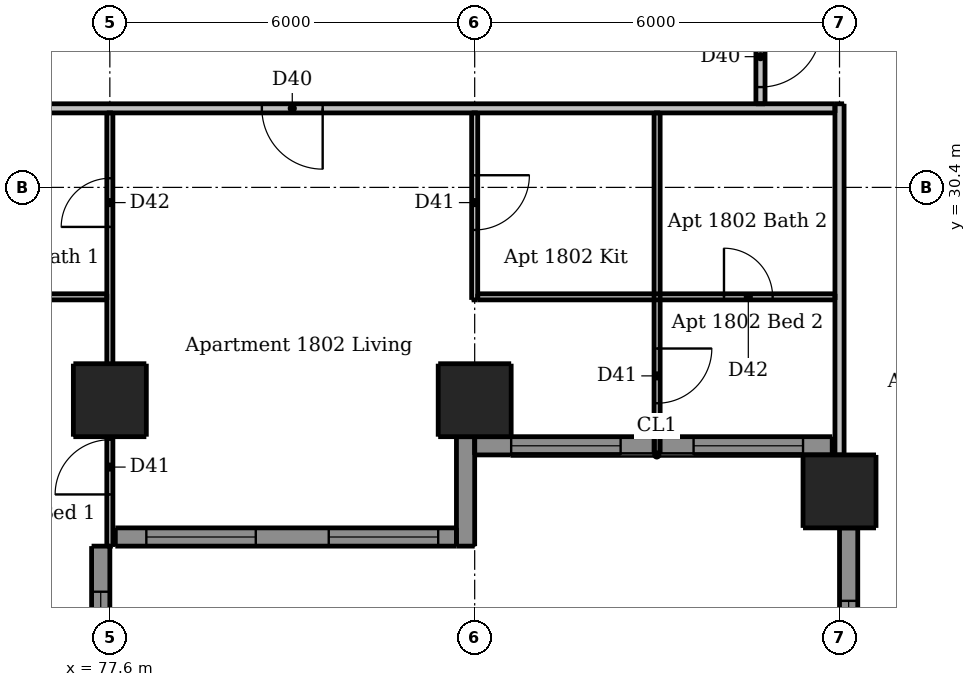
"""IFC4 building model, lengths in metres.
Left out: names, types, materials, properties, quantities, classifications, styles, units other than length and angle.
Written with IfcOpenShell. Run it as: python <this file> out.ifc"""

import sys

from ifc_helpers import new_model, si_unit, direction, frame, frame_2d, origin, origin_2d, place, context, subcontext, project, spatial, rectangle, extrude, element, fill, save


model = new_model("IFC4")
c1 = context("Model", 3, precision=1e-05, world=origin(), true_north=direction((0.0, 1.0)))
c2 = subcontext(c1, "Body", "Model", "MODEL_VIEW")
j1 = project(units=[si_unit("LENGTHUNIT", "METRE"), si_unit("PLANEANGLEUNIT", "RADIAN")], contexts=[c1])
p1 = place(None, origin())
s1 = spatial("IfcSite", under=j1, at=p1, CompositionType="ELEMENT")
p2 = place(p1, origin())
s2 = spatial("IfcBuilding", under=s1, at=p2, CompositionType="ELEMENT")
p3 = place(p2, frame((0.0, 0.0, 66.4)))
s3 = spatial("IfcBuildingStorey", under=s2, at=p3, CompositionType="ELEMENT", Elevation=66.4)
for number, where, z_axis, x_axis in (
    (1, (77.6, 26.9, 0.0), (0.0, 0.0, 1.0), (1.0, 0.0, 0.0)),
    (2, (83.6, 26.9, 0.0), (0.0, 0.0, 1.0), (1.0, 0.0, 0.0)),
    (3, (89.6, 25.4, 0.0), (0.0, 0.0, 1.0), (1.0, 0.0, 0.0)),
):
    element("IfcColumn", number, at=place(p3, frame(where, z_axis=z_axis, x_axis=x_axis)), inside=s3, PredefinedType="COLUMN", context=c2, shape_type="SweptSolid", body=[
        extrude(rectangle(XDim=1.2, YDim=1.2, at=origin_2d()), origin(), (0.0, 0.0, 1.0), 2.95),
    ])
p4 = place(p3, frame((77.45, 21.5, 0.0), z_axis=(0.0, 0.0, 1.0), x_axis=(0.0, 1.0, 0.0)))
e4 = element("IfcWall", 4, at=p4, inside=s3, PredefinedType="SOLIDWALL", context=c2, shape_type="SweptSolid", body=[
    extrude(rectangle(XDim=3.0, YDim=0.3, at=frame_2d((1.5, 0.0))), origin(), (0.0, 0.0, 1.0), 2.95),
])
p5 = place(p4, frame((0.75, 0.0, 0.9)))
e5 = element("IfcOpeningElement", 5, at=p5, cuts=e4, PredefinedType="OPENING", context=c2, shape_type="SweptSolid", body=[
    extrude(rectangle(XDim=1.5, YDim=1.5, at=frame_2d((0.75, 0.75))), frame((0.0, 0.16, 0.0), z_axis=(0.0, -1.0, 0.0), x_axis=(1.0, 0.0, 0.0)), (0.0, 0.0, 1.0), 0.32),
])
p6 = place(p3, frame((83.45, 24.5, 0.0), z_axis=(0.0, 0.0, 1.0), x_axis=(0.0, 1.0, 0.0)))
e6 = element("IfcWall", 6, at=p6, inside=s3, PredefinedType="SOLIDWALL", context=c2, shape_type="SweptSolid", body=[
    extrude(rectangle(XDim=1.8, YDim=0.3, at=frame_2d((0.9, 0.0))), origin(), (0.0, 0.0, 1.0), 2.95),
])
p7 = place(p3, frame((89.75, 24.8, 0.0), z_axis=(0.0, 0.0, 1.0), x_axis=(0.0, -1.0, 0.0)))
e7 = element("IfcWall", 7, at=p7, inside=s3, PredefinedType="SOLIDWALL", context=c2, shape_type="SweptSolid", body=[
    extrude(rectangle(XDim=4.8, YDim=0.3, at=frame_2d((2.4, 0.0))), origin(), (0.0, 0.0, 1.0), 2.95),
])
p8 = place(p7, frame((1.2, 0.0, 0.15)))
e8 = element("IfcOpeningElement", 8, at=p8, cuts=e7, PredefinedType="OPENING", context=c2, shape_type="SweptSolid", body=[
    extrude(rectangle(XDim=2.4, YDim=2.1, at=frame_2d((1.2, 1.05))), frame((0.0, 0.16, 0.0), z_axis=(0.0, -1.0, 0.0), x_axis=(1.0, 0.0, 0.0)), (0.0, 0.0, 1.0), 0.32),
])
p9 = place(p3, frame((77.69, 24.65, 0.0), z_axis=(0.0, 0.0, 1.0), x_axis=(1.0, 0.0, 0.0)))
e9 = element("IfcWall", 9, at=p9, inside=s3, PredefinedType="SOLIDWALL", context=c2, shape_type="SweptSolid", body=[
    extrude(rectangle(XDim=5.61, YDim=0.3, at=frame_2d((2.805, 0.0))), origin(), (0.0, 0.0, 1.0), 2.95),
])
p10 = place(p9, frame((0.51, 0.0, 0.15)))
e10 = element("IfcOpeningElement", 10, at=p10, cuts=e9, PredefinedType="OPENING", context=c2, shape_type="SweptSolid", body=[
    extrude(rectangle(XDim=1.8, YDim=2.1, at=frame_2d((0.9, 1.05))), frame((0.0, 0.16, 0.0), z_axis=(0.0, -1.0, 0.0), x_axis=(1.0, 0.0, 0.0)), (0.0, 0.0, 1.0), 0.32),
])
p11 = place(p9, frame((3.51, 0.0, 0.15)))
e11 = element("IfcOpeningElement", 11, at=p11, cuts=e9, PredefinedType="OPENING", context=c2, shape_type="SweptSolid", body=[
    extrude(rectangle(XDim=1.8, YDim=2.1, at=frame_2d((0.9, 1.05))), frame((0.0, 0.16, 0.0), z_axis=(0.0, -1.0, 0.0), x_axis=(1.0, 0.0, 0.0)), (0.0, 0.0, 1.0), 0.32),
])
p12 = place(p3, frame((83.6, 26.15, 0.0), z_axis=(0.0, 0.0, 1.0), x_axis=(1.0, 0.0, 0.0)))
e12 = element("IfcWall", 12, at=p12, inside=s3, PredefinedType="SOLIDWALL", context=c2, shape_type="SweptSolid", body=[
    extrude(rectangle(XDim=5.88, YDim=0.3, at=frame_2d((2.94, 0.0))), origin(), (0.0, 0.0, 1.0), 2.95),
])
p13 = place(p12, frame((0.6, 0.0, 0.15)))
e13 = element("IfcOpeningElement", 13, at=p13, cuts=e12, PredefinedType="OPENING", context=c2, shape_type="SweptSolid", body=[
    extrude(rectangle(XDim=1.8, YDim=2.1, at=frame_2d((0.9, 1.05))), frame((0.0, 0.16, 0.0), z_axis=(0.0, -1.0, 0.0), x_axis=(1.0, 0.0, 0.0)), (0.0, 0.0, 1.0), 0.32),
])
p14 = place(p12, frame((3.6, 0.0, 0.15)))
e14 = element("IfcOpeningElement", 14, at=p14, cuts=e12, PredefinedType="OPENING", context=c2, shape_type="SweptSolid", body=[
    extrude(rectangle(XDim=1.8, YDim=2.1, at=frame_2d((0.9, 1.05))), frame((0.0, 0.16, 0.0), z_axis=(0.0, -1.0, 0.0), x_axis=(1.0, 0.0, 0.0)), (0.0, 0.0, 1.0), 0.32),
])
p15 = place(p3, frame((77.6, 24.5, 0.0), z_axis=(0.0, 0.0, 1.0), x_axis=(0.0, 1.0, 0.0)))
e15 = element("IfcWall", 15, at=p15, inside=s3, PredefinedType="PARTITIONING", context=c2, shape_type="SweptSolid", body=[
    extrude(rectangle(XDim=7.125, YDim=0.1, at=frame_2d((3.562, 0.0))), origin(), (0.0, 0.0, 1.0), 2.332),
])
p16 = place(p15, frame((0.85, 0.0, 0.0)))
e16 = element("IfcOpeningElement", 16, at=p16, cuts=e15, PredefinedType="OPENING", context=c2, shape_type="SweptSolid", body=[
    extrude(rectangle(XDim=0.9, YDim=2.1, at=frame_2d((0.45, 1.05))), frame((0.0, 0.06, 0.0), z_axis=(0.0, -1.0, 0.0), x_axis=(1.0, 0.0, 0.0)), (0.0, 0.0, 1.0), 0.12),
])
p17 = place(p15, frame((5.25, 0.0, 0.0)))
e17 = element("IfcOpeningElement", 17, at=p17, cuts=e15, PredefinedType="OPENING", context=c2, shape_type="SweptSolid", body=[
    extrude(rectangle(XDim=0.8, YDim=2.1, at=frame_2d((0.4, 1.05))), frame((0.0, 0.06, 0.0), z_axis=(0.0, -1.0, 0.0), x_axis=(1.0, 0.0, 0.0)), (0.0, 0.0, 1.0), 0.12),
])
p18 = place(p3, frame((83.6, 31.625, 0.0), z_axis=(0.0, 0.0, 1.0), x_axis=(0.0, -1.0, 0.0)))
e18 = element("IfcWall", 18, at=p18, inside=s3, PredefinedType="PARTITIONING", context=c2, shape_type="SweptSolid", body=[
    extrude(rectangle(XDim=3.075, YDim=0.1, at=frame_2d((1.538, 0.0))), origin(), (0.0, 0.0, 1.0), 2.332),
])
p19 = place(p18, frame((1.025, 0.0, 0.0)))
e19 = element("IfcOpeningElement", 19, at=p19, cuts=e18, PredefinedType="OPENING", context=c2, shape_type="SweptSolid", body=[
    extrude(rectangle(XDim=0.9, YDim=2.1, at=frame_2d((0.45, 1.05))), frame((0.0, 0.06, 0.0), z_axis=(0.0, -1.0, 0.0), x_axis=(1.0, 0.0, 0.0)), (0.0, 0.0, 1.0), 0.12),
])
p20 = place(p3, frame((86.6, 31.625, 0.0), z_axis=(0.0, 0.0, 1.0), x_axis=(0.0, -1.0, 0.0)))
e20 = element("IfcWall", 20, at=p20, inside=s3, PredefinedType="PARTITIONING", context=c2, shape_type="SweptSolid", body=[
    extrude(rectangle(XDim=5.625, YDim=0.1, at=frame_2d((2.812, 0.0))), origin(), (0.0, 0.0, 1.0), 2.95),
])
p21 = place(p20, frame((3.875, 0.0, 0.0)))
e21 = element("IfcOpeningElement", 21, at=p21, cuts=e20, PredefinedType="OPENING", context=c2, shape_type="SweptSolid", body=[
    extrude(rectangle(XDim=0.9, YDim=2.1, at=frame_2d((0.45, 1.05))), frame((0.0, 0.06, 0.0), z_axis=(0.0, -1.0, 0.0), x_axis=(1.0, 0.0, 0.0)), (0.0, 0.0, 1.0), 0.12),
])
p22 = place(p3, frame((74.675, 28.6, 0.0), z_axis=(0.0, 0.0, 1.0), x_axis=(1.0, 0.0, 0.0)))
e22 = element("IfcWall", 22, at=p22, inside=s3, PredefinedType="PARTITIONING", context=c2, shape_type="SweptSolid", body=[
    extrude(rectangle(XDim=2.875, YDim=0.1, at=frame_2d((1.438, 0.0))), origin(), (0.0, 0.0, 1.0), 2.95),
])
p23 = place(p3, frame((83.65, 28.6, 0.0), z_axis=(0.0, 0.0, 1.0), x_axis=(1.0, 0.0, 0.0)))
e23 = element("IfcWall", 23, at=p23, inside=s3, PredefinedType="PARTITIONING", context=c2, shape_type="SweptSolid", body=[
    extrude(rectangle(XDim=5.875, YDim=0.1, at=frame_2d((2.938, 0.0))), origin(), (0.0, 0.0, 1.0), 2.95),
])
p24 = place(p23, frame((4.05, 0.0, 0.0)))
e24 = element("IfcOpeningElement", 24, at=p24, cuts=e23, PredefinedType="OPENING", context=c2, shape_type="SweptSolid", body=[
    extrude(rectangle(XDim=0.8, YDim=2.1, at=frame_2d((0.4, 1.05))), frame((0.0, 0.06, 0.0), z_axis=(0.0, -1.0, 0.0), x_axis=(1.0, 0.0, 0.0)), (0.0, 0.0, 1.0), 0.12),
])
p25 = place(p3, frame((88.3, 60.475, 0.0), z_axis=(0.0, 0.0, 1.0), x_axis=(0.0, -1.0, 0.0)))
e25 = element("IfcWall", 25, at=p25, inside=s3, PredefinedType="PARTITIONING", context=c2, shape_type="SweptSolid", body=[
    extrude(rectangle(XDim=28.7, YDim=0.15, at=frame_2d((14.35, 0.0))), origin(), (0.0, 0.0, 1.0), 2.95),
])
p26 = place(p25, frame((27.425, 0.0, 0.0)))
e26 = element("IfcOpeningElement", 26, at=p26, cuts=e25, PredefinedType="OPENING", context=c2, shape_type="SweptSolid", body=[
    extrude(rectangle(XDim=1.0, YDim=2.1, at=frame_2d((0.5, 1.05))), frame((0.0, 0.085, 0.0), z_axis=(0.0, -1.0, 0.0), x_axis=(1.0, 0.0, 0.0)), (0.0, 0.0, 1.0), 0.17),
])
p27 = place(p25, frame((14.525, 0.0, 0.0)))
e27 = element("IfcOpeningElement", 27, at=p27, cuts=e25, PredefinedType="OPENING", context=c2, shape_type="SweptSolid", body=[
    extrude(rectangle(XDim=1.0, YDim=2.1, at=frame_2d((0.5, 1.05))), frame((0.0, 0.085, 0.0), z_axis=(0.0, -1.0, 0.0), x_axis=(1.0, 0.0, 0.0)), (0.0, 0.0, 1.0), 0.17),
])
p28 = place(p25, frame((3.775, 0.0, 0.0)))
e28 = element("IfcOpeningElement", 28, at=p28, cuts=e25, PredefinedType="OPENING", context=c2, shape_type="SweptSolid", body=[
    extrude(rectangle(XDim=1.0, YDim=2.1, at=frame_2d((0.5, 1.05))), frame((0.0, 0.085, 0.0), z_axis=(0.0, -1.0, 0.0), x_axis=(1.0, 0.0, 0.0)), (0.0, 0.0, 1.0), 0.17),
])
p29 = place(p3, frame((89.6, 26.0, 0.0), z_axis=(0.0, 0.0, 1.0), x_axis=(0.0, 1.0, 0.0)))
e29 = element("IfcWall", 29, at=p29, inside=s3, PredefinedType="PARTITIONING", context=c2, shape_type="SweptSolid", body=[
    extrude(rectangle(XDim=5.775, YDim=0.15, at=frame_2d((2.887, 0.0))), origin(), (0.0, 0.0, 1.0), 2.332),
])
p30 = place(p3, frame((89.525, 31.7, 0.0), z_axis=(0.0, 0.0, 1.0), x_axis=(-1.0, 0.0, 0.0)))
e30 = element("IfcWall", 30, at=p30, inside=s3, PredefinedType="PARTITIONING", context=c2, shape_type="SweptSolid", body=[
    extrude(rectangle(XDim=28.75, YDim=0.15, at=frame_2d((14.375, 0.0))), origin(), (0.0, 0.0, 1.0), 2.95),
])
p31 = place(p30, frame((24.625, 0.0, 0.0)))
e31 = element("IfcOpeningElement", 31, at=p31, cuts=e30, PredefinedType="OPENING", context=c2, shape_type="SweptSolid", body=[
    extrude(rectangle(XDim=1.0, YDim=2.1, at=frame_2d((0.5, 1.05))), frame((0.0, 0.085, 0.0), z_axis=(0.0, -1.0, 0.0), x_axis=(1.0, 0.0, 0.0)), (0.0, 0.0, 1.0), 0.17),
])
p32 = place(p30, frame((8.425, 0.0, 0.0)))
e32 = element("IfcOpeningElement", 32, at=p32, cuts=e30, PredefinedType="OPENING", context=c2, shape_type="SweptSolid", body=[
    extrude(rectangle(XDim=1.0, YDim=2.1, at=frame_2d((0.5, 1.05))), frame((0.0, 0.085, 0.0), z_axis=(0.0, -1.0, 0.0), x_axis=(1.0, 0.0, 0.0)), (0.0, 0.0, 1.0), 0.17),
])
p33 = place(p5, origin())
e33 = element("IfcWindow", 33, at=p33, inside=s3, PartitioningType="DOUBLE_PANEL_VERTICAL", PredefinedType="WINDOW", context=c2, shape_type="SweptSolid", body=[
    extrude(rectangle(XDim=1.5, YDim=1.5, at=frame_2d((0.75, 0.75))), frame((0.0, 0.03, 0.0), z_axis=(0.0, -1.0, 0.0), x_axis=(1.0, 0.0, 0.0)), (0.0, 0.0, 1.0), 0.06),
])
fill(e5, e33)
p34 = place(p8, origin())
e34 = element("IfcWindow", 34, at=p34, inside=s3, PartitioningType="DOUBLE_PANEL_VERTICAL", PredefinedType="WINDOW", context=c2, shape_type="SweptSolid", body=[
    extrude(rectangle(XDim=2.4, YDim=2.1, at=frame_2d((1.2, 1.05))), frame((0.0, 0.03, 0.0), z_axis=(0.0, -1.0, 0.0), x_axis=(1.0, 0.0, 0.0)), (0.0, 0.0, 1.0), 0.06),
])
fill(e8, e34)
p35 = place(p10, origin())
e35 = element("IfcWindow", 35, at=p35, inside=s3, PartitioningType="DOUBLE_PANEL_VERTICAL", PredefinedType="WINDOW", context=c2, shape_type="SweptSolid", body=[
    extrude(rectangle(XDim=1.8, YDim=2.1, at=frame_2d((0.9, 1.05))), frame((0.0, 0.03, 0.0), z_axis=(0.0, -1.0, 0.0), x_axis=(1.0, 0.0, 0.0)), (0.0, 0.0, 1.0), 0.06),
])
fill(e10, e35)
p36 = place(p11, origin())
e36 = element("IfcWindow", 36, at=p36, inside=s3, PartitioningType="DOUBLE_PANEL_VERTICAL", PredefinedType="WINDOW", context=c2, shape_type="SweptSolid", body=[
    extrude(rectangle(XDim=1.8, YDim=2.1, at=frame_2d((0.9, 1.05))), frame((0.0, 0.03, 0.0), z_axis=(0.0, -1.0, 0.0), x_axis=(1.0, 0.0, 0.0)), (0.0, 0.0, 1.0), 0.06),
])
fill(e11, e36)
p37 = place(p13, origin())
e37 = element("IfcWindow", 37, at=p37, inside=s3, PartitioningType="DOUBLE_PANEL_VERTICAL", PredefinedType="WINDOW", context=c2, shape_type="SweptSolid", body=[
    extrude(rectangle(XDim=1.8, YDim=2.1, at=frame_2d((0.9, 1.05))), frame((0.0, 0.03, 0.0), z_axis=(0.0, -1.0, 0.0), x_axis=(1.0, 0.0, 0.0)), (0.0, 0.0, 1.0), 0.06),
])
fill(e13, e37)
p38 = place(p14, origin())
e38 = element("IfcWindow", 38, at=p38, inside=s3, PartitioningType="DOUBLE_PANEL_VERTICAL", PredefinedType="WINDOW", context=c2, shape_type="SweptSolid", body=[
    extrude(rectangle(XDim=1.8, YDim=2.1, at=frame_2d((0.9, 1.05))), frame((0.0, 0.03, 0.0), z_axis=(0.0, -1.0, 0.0), x_axis=(1.0, 0.0, 0.0)), (0.0, 0.0, 1.0), 0.06),
])
fill(e14, e38)
p39 = place(p32, origin())
e39 = element("IfcDoor", 39, at=p39, inside=s3, OperationType="SINGLE_SWING_LEFT", PredefinedType="DOOR", context=c2, shape_type="SweptSolid", body=[
    extrude(rectangle(XDim=1.0, YDim=2.1, at=frame_2d((0.5, 1.05))), frame((0.0, 0.025, 0.0), z_axis=(0.0, -1.0, 0.0), x_axis=(1.0, 0.0, 0.0)), (0.0, 0.0, 1.0), 0.05),
])
fill(e32, e39)
p40 = place(p19, origin())
e40 = element("IfcDoor", 40, at=p40, inside=s3, OperationType="SINGLE_SWING_LEFT", PredefinedType="DOOR", context=c2, shape_type="SweptSolid", body=[
    extrude(rectangle(XDim=0.9, YDim=2.1, at=frame_2d((0.45, 1.05))), frame((0.0, 0.025, 0.0), z_axis=(0.0, -1.0, 0.0), x_axis=(1.0, 0.0, 0.0)), (0.0, 0.0, 1.0), 0.05),
])
fill(e19, e40)
p41 = place(p16, origin())
e41 = element("IfcDoor", 41, at=p41, inside=s3, OperationType="SINGLE_SWING_LEFT", PredefinedType="DOOR", context=c2, shape_type="SweptSolid", body=[
    extrude(rectangle(XDim=0.9, YDim=2.1, at=frame_2d((0.45, 1.05))), frame((0.0, 0.025, 0.0), z_axis=(0.0, -1.0, 0.0), x_axis=(1.0, 0.0, 0.0)), (0.0, 0.0, 1.0), 0.05),
])
fill(e16, e41)
p42 = place(p17, origin())
e42 = element("IfcDoor", 42, at=p42, inside=s3, OperationType="SINGLE_SWING_LEFT", PredefinedType="DOOR", context=c2, shape_type="SweptSolid", body=[
    extrude(rectangle(XDim=0.8, YDim=2.1, at=frame_2d((0.4, 1.05))), frame((0.0, 0.025, 0.0), z_axis=(0.0, -1.0, 0.0), x_axis=(1.0, 0.0, 0.0)), (0.0, 0.0, 1.0), 0.05),
])
fill(e17, e42)
p43 = place(p21, origin())
e43 = element("IfcDoor", 43, at=p43, inside=s3, OperationType="SINGLE_SWING_LEFT", PredefinedType="DOOR", context=c2, shape_type="SweptSolid", body=[
    extrude(rectangle(XDim=0.9, YDim=2.1, at=frame_2d((0.45, 1.05))), frame((0.0, 0.025, 0.0), z_axis=(0.0, -1.0, 0.0), x_axis=(1.0, 0.0, 0.0)), (0.0, 0.0, 1.0), 0.05),
])
fill(e21, e43)
p44 = place(p24, origin())
e44 = element("IfcDoor", 44, at=p44, inside=s3, OperationType="SINGLE_SWING_LEFT", PredefinedType="DOOR", context=c2, shape_type="SweptSolid", body=[
    extrude(rectangle(XDim=0.8, YDim=2.1, at=frame_2d((0.4, 1.05))), frame((0.0, 0.025, 0.0), z_axis=(0.0, -1.0, 0.0), x_axis=(1.0, 0.0, 0.0)), (0.0, 0.0, 1.0), 0.05),
])
fill(e24, e44)
p45 = place(p26, origin())
e45 = element("IfcDoor", 45, at=p45, inside=s3, OperationType="SINGLE_SWING_LEFT", PredefinedType="DOOR", context=c2, shape_type="SweptSolid", body=[
    extrude(rectangle(XDim=1.0, YDim=2.1, at=frame_2d((0.5, 1.05))), frame((0.0, 0.025, 0.0), z_axis=(0.0, -1.0, 0.0), x_axis=(1.0, 0.0, 0.0)), (0.0, 0.0, 1.0), 0.05),
])
fill(e26, e45)
save(model, sys.argv[1])
